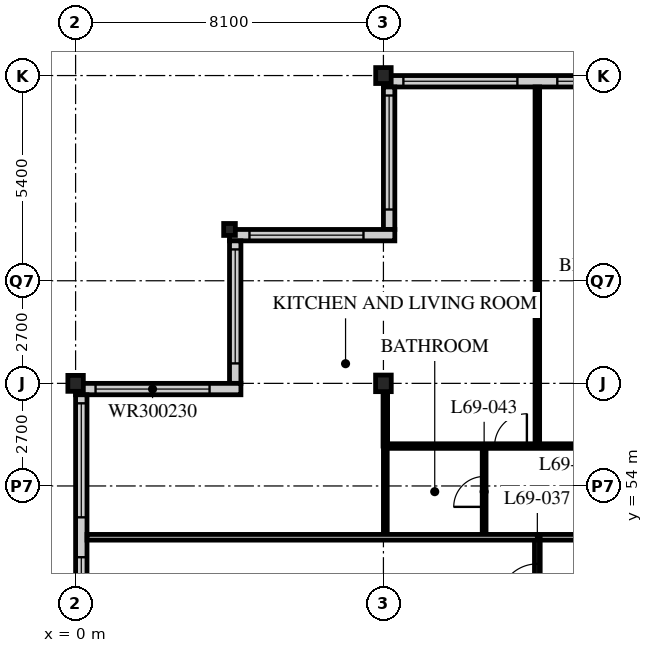
"""IFC4 building model, lengths in metres.
Left out: names, types, materials, properties, quantities, classifications, styles, units other than length and angle.
Written with IfcOpenShell. Run it as: python <this file> out.ifc"""

import sys

from ifc_helpers import new_model, si_unit, direction, frame, frame_2d, origin, origin_2d, place, context, subcontext, project, spatial, rectangle, i_section, extrude, element, fill, save


model = new_model("IFC4")
c1 = context("Model", 3, precision=1e-05, world=origin(), true_north=direction((0.0, 1.0)))
c2 = subcontext(c1, "Body", "Model", "MODEL_VIEW")
j1 = project(units=[si_unit("LENGTHUNIT", "METRE"), si_unit("PLANEANGLEUNIT", "RADIAN")], contexts=[c1])
p1 = place(None, origin())
s1 = spatial("IfcSite", under=j1, at=p1, CompositionType="ELEMENT")
p2 = place(p1, origin())
s2 = spatial("IfcBuilding", under=s1, at=p2, CompositionType="ELEMENT")
p3 = place(p2, frame((0.0, 0.0, 269.7)))
s3 = spatial("IfcBuildingStorey", under=s2, at=p3, CompositionType="ELEMENT", Elevation=269.7)
p4 = place(p3, frame((0.0, 56.7, 0.0), z_axis=(0.0, 0.0, 1.0), x_axis=(1.0, 0.0, 0.0)))
e1 = element("IfcColumn", 1, at=p4, inside=s3, PredefinedType="COLUMN", context=c2, shape_type="SweptSolid", body=[
    extrude(i_section(OverallWidth=0.407, OverallDepth=0.419, WebThickness=0.031, FlangeThickness=0.049, FilletRadius=0.015, at=origin_2d()), origin(), (0.0, 0.0, 1.0), 3.9),
])
p5 = place(p3, frame((4.05, 60.75, 0.0), z_axis=(0.0, 0.0, 1.0), x_axis=(1.0, 0.0, 0.0)))
e2 = element("IfcColumn", 2, at=p5, inside=s3, PredefinedType="COLUMN", context=c2, shape_type="SweptSolid", body=[
    extrude(i_section(OverallWidth=0.307, OverallDepth=0.314, WebThickness=0.012, FlangeThickness=0.019, FilletRadius=0.015, at=origin_2d()), origin(), (0.0, 0.0, 1.0), 3.9),
])
p6 = place(p3, frame((8.1, 56.7, 0.0), z_axis=(0.0, 0.0, 1.0), x_axis=(1.0, 0.0, 0.0)))
e3 = element("IfcColumn", 3, at=p6, inside=s3, PredefinedType="COLUMN", context=c2, shape_type="SweptSolid", body=[
    extrude(i_section(OverallWidth=0.412, OverallDepth=0.437, WebThickness=0.036, FlangeThickness=0.058, FilletRadius=0.015, at=origin_2d()), origin(), (0.0, 0.0, 1.0), 3.9),
])
p7 = place(p3, frame((8.1, 64.8, 0.0), z_axis=(0.0, 0.0, 1.0), x_axis=(1.0, 0.0, 0.0)))
e4 = element("IfcColumn", 4, at=p7, inside=s3, PredefinedType="COLUMN", context=c2, shape_type="SweptSolid", body=[
    extrude(i_section(OverallWidth=0.407, OverallDepth=0.419, WebThickness=0.031, FlangeThickness=0.049, FilletRadius=0.015, at=origin_2d()), origin(), (0.0, 0.0, 1.0), 3.9),
])
p8 = place(p3, frame((48.3, 64.65, 0.0), z_axis=(0.0, 0.0, 1.0), x_axis=(-1.0, 0.0, 0.0)))
e5 = element("IfcWall", 5, at=p8, inside=s3, PredefinedType="SOLIDWALL", context=c2, shape_type="SweptSolid", body=[
    extrude(rectangle(XDim=40.2, YDim=0.3, at=frame_2d((20.1, 0.0))), origin(), (0.0, 0.0, 1.0), 3.69),
])
p9 = place(p8, frame((0.225, 0.0, 0.6)))
e6 = element("IfcOpeningElement", 6, at=p9, cuts=e5, PredefinedType="OPENING", context=c2, shape_type="SweptSolid", body=[
    extrude(rectangle(XDim=3.0, YDim=2.4, at=frame_2d((1.5, 1.2))), frame((0.0, 0.16, 0.0), z_axis=(0.0, -1.0, 0.0), x_axis=(1.0, 0.0, 0.0)), (0.0, 0.0, 1.0), 0.32),
])
p10 = place(p8, frame((4.275, 0.0, 0.6)))
e7 = element("IfcOpeningElement", 7, at=p10, cuts=e5, PredefinedType="OPENING", context=c2, shape_type="SweptSolid", body=[
    extrude(rectangle(XDim=3.0, YDim=2.4, at=frame_2d((1.5, 1.2))), frame((0.0, 0.16, 0.0), z_axis=(0.0, -1.0, 0.0), x_axis=(1.0, 0.0, 0.0)), (0.0, 0.0, 1.0), 0.32),
])
p11 = place(p8, frame((8.325, 0.0, 0.6)))
e8 = element("IfcOpeningElement", 8, at=p11, cuts=e5, PredefinedType="OPENING", context=c2, shape_type="SweptSolid", body=[
    extrude(rectangle(XDim=3.0, YDim=2.4, at=frame_2d((1.5, 1.2))), frame((0.0, 0.16, 0.0), z_axis=(0.0, -1.0, 0.0), x_axis=(1.0, 0.0, 0.0)), (0.0, 0.0, 1.0), 0.32),
])
p12 = place(p8, frame((12.375, 0.0, 0.6)))
e9 = element("IfcOpeningElement", 9, at=p12, cuts=e5, PredefinedType="OPENING", context=c2, shape_type="SweptSolid", body=[
    extrude(rectangle(XDim=3.0, YDim=2.4, at=frame_2d((1.5, 1.2))), frame((0.0, 0.16, 0.0), z_axis=(0.0, -1.0, 0.0), x_axis=(1.0, 0.0, 0.0)), (0.0, 0.0, 1.0), 0.32),
])
p13 = place(p8, frame((16.425, 0.0, 0.6)))
e10 = element("IfcOpeningElement", 10, at=p13, cuts=e5, PredefinedType="OPENING", context=c2, shape_type="SweptSolid", body=[
    extrude(rectangle(XDim=3.0, YDim=2.4, at=frame_2d((1.5, 1.2))), frame((0.0, 0.16, 0.0), z_axis=(0.0, -1.0, 0.0), x_axis=(1.0, 0.0, 0.0)), (0.0, 0.0, 1.0), 0.32),
])
p14 = place(p8, frame((20.475, 0.0, 0.6)))
e11 = element("IfcOpeningElement", 11, at=p14, cuts=e5, PredefinedType="OPENING", context=c2, shape_type="SweptSolid", body=[
    extrude(rectangle(XDim=3.0, YDim=2.4, at=frame_2d((1.5, 1.2))), frame((0.0, 0.16, 0.0), z_axis=(0.0, -1.0, 0.0), x_axis=(1.0, 0.0, 0.0)), (0.0, 0.0, 1.0), 0.32),
])
p15 = place(p8, frame((24.525, 0.0, 0.6)))
e12 = element("IfcOpeningElement", 12, at=p15, cuts=e5, PredefinedType="OPENING", context=c2, shape_type="SweptSolid", body=[
    extrude(rectangle(XDim=3.0, YDim=2.4, at=frame_2d((1.5, 1.2))), frame((0.0, 0.16, 0.0), z_axis=(0.0, -1.0, 0.0), x_axis=(1.0, 0.0, 0.0)), (0.0, 0.0, 1.0), 0.32),
])
p16 = place(p8, frame((28.575, 0.0, 0.6)))
e13 = element("IfcOpeningElement", 13, at=p16, cuts=e5, PredefinedType="OPENING", context=c2, shape_type="SweptSolid", body=[
    extrude(rectangle(XDim=3.0, YDim=2.4, at=frame_2d((1.5, 1.2))), frame((0.0, 0.16, 0.0), z_axis=(0.0, -1.0, 0.0), x_axis=(1.0, 0.0, 0.0)), (0.0, 0.0, 1.0), 0.32),
])
p17 = place(p8, frame((32.625, 0.0, 0.6)))
e14 = element("IfcOpeningElement", 14, at=p17, cuts=e5, PredefinedType="OPENING", context=c2, shape_type="SweptSolid", body=[
    extrude(rectangle(XDim=3.0, YDim=2.4, at=frame_2d((1.5, 1.2))), frame((0.0, 0.16, 0.0), z_axis=(0.0, -1.0, 0.0), x_axis=(1.0, 0.0, 0.0)), (0.0, 0.0, 1.0), 0.32),
])
p18 = place(p8, frame((36.675, 0.0, 0.6)))
e15 = element("IfcOpeningElement", 15, at=p18, cuts=e5, PredefinedType="OPENING", context=c2, shape_type="SweptSolid", body=[
    extrude(rectangle(XDim=3.0, YDim=2.4, at=frame_2d((1.5, 1.2))), frame((0.0, 0.16, 0.0), z_axis=(0.0, -1.0, 0.0), x_axis=(1.0, 0.0, 0.0)), (0.0, 0.0, 1.0), 0.32),
])
p19 = place(p3, frame((8.25, 64.5, 0.0), z_axis=(0.0, 0.0, 1.0), x_axis=(0.0, -1.0, 0.0)))
e16 = element("IfcWall", 16, at=p19, inside=s3, PredefinedType="SOLIDWALL", context=c2, shape_type="SweptSolid", body=[
    extrude(rectangle(XDim=3.75, YDim=0.3, at=frame_2d((1.875, 0.0))), origin(), (0.0, 0.0, 1.0), 3.69),
])
p20 = place(p19, frame((0.225, 0.0, 0.6)))
e17 = element("IfcOpeningElement", 17, at=p20, cuts=e16, PredefinedType="OPENING", context=c2, shape_type="SweptSolid", body=[
    extrude(rectangle(XDim=3.0, YDim=2.3, at=frame_2d((1.5, 1.15))), frame((0.0, 0.16, 0.0), z_axis=(0.0, -1.0, 0.0), x_axis=(1.0, 0.0, 0.0)), (0.0, 0.0, 1.0), 0.32),
])
p21 = place(p3, frame((8.4, 60.6, 0.0), z_axis=(0.0, 0.0, 1.0), x_axis=(-1.0, 0.0, 0.0)))
e18 = element("IfcWall", 18, at=p21, inside=s3, PredefinedType="SOLIDWALL", context=c2, shape_type="SweptSolid", body=[
    extrude(rectangle(XDim=4.35, YDim=0.3, at=frame_2d((2.175, 0.0))), origin(), (0.0, 0.0, 1.0), 3.69),
])
p22 = place(p21, frame((0.825, 0.0, 0.6)))
e19 = element("IfcOpeningElement", 19, at=p22, cuts=e18, PredefinedType="OPENING", context=c2, shape_type="SweptSolid", body=[
    extrude(rectangle(XDim=3.0, YDim=2.3, at=frame_2d((1.5, 1.15))), frame((0.0, 0.16, 0.0), z_axis=(0.0, -1.0, 0.0), x_axis=(1.0, 0.0, 0.0)), (0.0, 0.0, 1.0), 0.32),
])
p23 = place(p3, frame((4.2, 60.45, 0.0), z_axis=(0.0, 0.0, 1.0), x_axis=(0.0, -1.0, 0.0)))
e20 = element("IfcWall", 20, at=p23, inside=s3, PredefinedType="SOLIDWALL", context=c2, shape_type="SweptSolid", body=[
    extrude(rectangle(XDim=3.75, YDim=0.3, at=frame_2d((1.875, 0.0))), origin(), (0.0, 0.0, 1.0), 3.69),
])
p24 = place(p23, frame((0.225, 0.0, 0.6)))
e21 = element("IfcOpeningElement", 21, at=p24, cuts=e20, PredefinedType="OPENING", context=c2, shape_type="SweptSolid", body=[
    extrude(rectangle(XDim=3.0, YDim=2.3, at=frame_2d((1.5, 1.15))), frame((0.0, 0.16, 0.0), z_axis=(0.0, -1.0, 0.0), x_axis=(1.0, 0.0, 0.0)), (0.0, 0.0, 1.0), 0.32),
])
p25 = place(p3, frame((4.35, 56.55, 0.0), z_axis=(0.0, 0.0, 1.0), x_axis=(-1.0, 0.0, 0.0)))
e22 = element("IfcWall", 22, at=p25, inside=s3, PredefinedType="SOLIDWALL", context=c2, shape_type="SweptSolid", body=[
    extrude(rectangle(XDim=4.35, YDim=0.3, at=frame_2d((2.175, 0.0))), origin(), (0.0, 0.0, 1.0), 3.69),
])
p26 = place(p25, frame((0.825, 0.0, 0.6)))
e23 = element("IfcOpeningElement", 23, at=p26, cuts=e22, PredefinedType="OPENING", context=c2, shape_type="SweptSolid", body=[
    extrude(rectangle(XDim=3.0, YDim=2.3, at=frame_2d((1.5, 1.15))), frame((0.0, 0.16, 0.0), z_axis=(0.0, -1.0, 0.0), x_axis=(1.0, 0.0, 0.0)), (0.0, 0.0, 1.0), 0.32),
])
p27 = place(p3, frame((0.15, 56.4, 0.0), z_axis=(0.0, 0.0, 1.0), x_axis=(0.0, -1.0, 0.0)))
e24 = element("IfcWall", 24, at=p27, inside=s3, PredefinedType="SOLIDWALL", context=c2, shape_type="SweptSolid", body=[
    extrude(rectangle(XDim=32.1, YDim=0.3, at=frame_2d((16.05, 0.0))), origin(), (0.0, 0.0, 1.0), 3.69),
])
p28 = place(p27, frame((0.225, 0.0, 0.6)))
e25 = element("IfcOpeningElement", 25, at=p28, cuts=e24, PredefinedType="OPENING", context=c2, shape_type="SweptSolid", body=[
    extrude(rectangle(XDim=3.0, YDim=2.4, at=frame_2d((1.5, 1.2))), frame((0.0, 0.16, 0.0), z_axis=(0.0, -1.0, 0.0), x_axis=(1.0, 0.0, 0.0)), (0.0, 0.0, 1.0), 0.32),
])
p29 = place(p27, frame((4.275, 0.0, 0.6)))
e26 = element("IfcOpeningElement", 26, at=p29, cuts=e24, PredefinedType="OPENING", context=c2, shape_type="SweptSolid", body=[
    extrude(rectangle(XDim=3.0, YDim=2.4, at=frame_2d((1.5, 1.2))), frame((0.0, 0.16, 0.0), z_axis=(0.0, -1.0, 0.0), x_axis=(1.0, 0.0, 0.0)), (0.0, 0.0, 1.0), 0.32),
])
p30 = place(p27, frame((8.325, 0.0, 0.6)))
e27 = element("IfcOpeningElement", 27, at=p30, cuts=e24, PredefinedType="OPENING", context=c2, shape_type="SweptSolid", body=[
    extrude(rectangle(XDim=3.0, YDim=2.4, at=frame_2d((1.5, 1.2))), frame((0.0, 0.16, 0.0), z_axis=(0.0, -1.0, 0.0), x_axis=(1.0, 0.0, 0.0)), (0.0, 0.0, 1.0), 0.32),
])
p31 = place(p27, frame((12.375, 0.0, 0.6)))
e28 = element("IfcOpeningElement", 28, at=p31, cuts=e24, PredefinedType="OPENING", context=c2, shape_type="SweptSolid", body=[
    extrude(rectangle(XDim=3.0, YDim=2.4, at=frame_2d((1.5, 1.2))), frame((0.0, 0.16, 0.0), z_axis=(0.0, -1.0, 0.0), x_axis=(1.0, 0.0, 0.0)), (0.0, 0.0, 1.0), 0.32),
])
p32 = place(p27, frame((16.425, 0.0, 0.6)))
e29 = element("IfcOpeningElement", 29, at=p32, cuts=e24, PredefinedType="OPENING", context=c2, shape_type="SweptSolid", body=[
    extrude(rectangle(XDim=3.0, YDim=2.4, at=frame_2d((1.5, 1.2))), frame((0.0, 0.16, 0.0), z_axis=(0.0, -1.0, 0.0), x_axis=(1.0, 0.0, 0.0)), (0.0, 0.0, 1.0), 0.32),
])
p33 = place(p27, frame((20.475, 0.0, 0.6)))
e30 = element("IfcOpeningElement", 30, at=p33, cuts=e24, PredefinedType="OPENING", context=c2, shape_type="SweptSolid", body=[
    extrude(rectangle(XDim=3.0, YDim=2.4, at=frame_2d((1.5, 1.2))), frame((0.0, 0.16, 0.0), z_axis=(0.0, -1.0, 0.0), x_axis=(1.0, 0.0, 0.0)), (0.0, 0.0, 1.0), 0.32),
])
p34 = place(p27, frame((24.525, 0.0, 0.6)))
e31 = element("IfcOpeningElement", 31, at=p34, cuts=e24, PredefinedType="OPENING", context=c2, shape_type="SweptSolid", body=[
    extrude(rectangle(XDim=3.0, YDim=2.4, at=frame_2d((1.5, 1.2))), frame((0.0, 0.16, 0.0), z_axis=(0.0, -1.0, 0.0), x_axis=(1.0, 0.0, 0.0)), (0.0, 0.0, 1.0), 0.32),
])
p35 = place(p27, frame((28.575, 0.0, 0.6)))
e32 = element("IfcOpeningElement", 32, at=p35, cuts=e24, PredefinedType="OPENING", context=c2, shape_type="SweptSolid", body=[
    extrude(rectangle(XDim=3.0, YDim=2.4, at=frame_2d((1.5, 1.2))), frame((0.0, 0.16, 0.0), z_axis=(0.0, -1.0, 0.0), x_axis=(1.0, 0.0, 0.0)), (0.0, 0.0, 1.0), 0.32),
])
p36 = place(p3, frame((12.15, 52.65, 0.0), z_axis=(0.0, 0.0, 1.0), x_axis=(1.0, 0.0, 0.0)))
e33 = element("IfcWall", 33, at=p36, inside=s3, PredefinedType="PARTITIONING", context=c2, shape_type="SweptSolid", body=[
    extrude(rectangle(XDim=24.3, YDim=0.15, at=frame_2d((12.15, 0.0))), origin(), (0.0, 0.0, 1.0), 3.69),
])
p37 = place(p36, frame((6.4, 0.0, 0.0)))
e34 = element("IfcOpeningElement", 34, at=p37, cuts=e33, PredefinedType="OPENING", context=c2, shape_type="SweptSolid", body=[
    extrude(rectangle(XDim=1.0, YDim=2.1, at=frame_2d((0.5, 1.05))), frame((0.0, 0.085, 0.0), z_axis=(0.0, -1.0, 0.0), x_axis=(1.0, 0.0, 0.0)), (0.0, 0.0, 1.0), 0.17),
])
p38 = place(p36, frame((8.5, 0.0, 0.0)))
e35 = element("IfcOpeningElement", 35, at=p38, cuts=e33, PredefinedType="OPENING", context=c2, shape_type="SweptSolid", body=[
    extrude(rectangle(XDim=1.0, YDim=2.1, at=frame_2d((0.5, 1.05))), frame((0.0, 0.085, 0.0), z_axis=(0.0, -1.0, 0.0), x_axis=(1.0, 0.0, 0.0)), (0.0, 0.0, 1.0), 0.17),
])
p39 = place(p36, frame((16.6, 0.0, 0.0)))
e36 = element("IfcOpeningElement", 36, at=p39, cuts=e33, PredefinedType="OPENING", context=c2, shape_type="SweptSolid", body=[
    extrude(rectangle(XDim=1.0, YDim=2.1, at=frame_2d((0.5, 1.05))), frame((0.0, 0.085, 0.0), z_axis=(0.0, -1.0, 0.0), x_axis=(1.0, 0.0, 0.0)), (0.0, 0.0, 1.0), 0.17),
])
p40 = place(p36, frame((1.525, 0.0, 0.0)))
e37 = element("IfcOpeningElement", 37, at=p40, cuts=e33, PredefinedType="OPENING", context=c2, shape_type="SweptSolid", body=[
    extrude(rectangle(XDim=1.0, YDim=2.1, at=frame_2d((0.5, 1.05))), frame((0.0, 0.085, 0.0), z_axis=(0.0, -1.0, 0.0), x_axis=(1.0, 0.0, 0.0)), (0.0, 0.0, 1.0), 0.17),
])
p41 = place(p3, frame((12.15, 22.5, 0.0), z_axis=(0.0, 0.0, 1.0), x_axis=(0.0, 1.0, 0.0)))
e38 = element("IfcWall", 38, at=p41, inside=s3, PredefinedType="PARTITIONING", context=c2, shape_type="SweptSolid", body=[
    extrude(rectangle(XDim=30.15, YDim=0.15, at=frame_2d((15.075, 0.0))), origin(), (0.0, 0.0, 1.0), 3.69),
])
p42 = place(p41, frame((0.4, 0.0, 0.0)))
e39 = element("IfcOpeningElement", 39, at=p42, cuts=e38, PredefinedType="OPENING", context=c2, shape_type="SweptSolid", body=[
    extrude(rectangle(XDim=1.0, YDim=2.1, at=frame_2d((0.5, 1.05))), frame((0.0, 0.085, 0.0), z_axis=(0.0, -1.0, 0.0), x_axis=(1.0, 0.0, 0.0)), (0.0, 0.0, 1.0), 0.17),
])
p43 = place(p41, frame((18.4, 0.0, 0.0)))
e40 = element("IfcOpeningElement", 40, at=p43, cuts=e38, PredefinedType="OPENING", context=c2, shape_type="SweptSolid", body=[
    extrude(rectangle(XDim=1.0, YDim=2.1, at=frame_2d((0.5, 1.05))), frame((0.0, 0.085, 0.0), z_axis=(0.0, -1.0, 0.0), x_axis=(1.0, 0.0, 0.0)), (0.0, 0.0, 1.0), 0.17),
])
p44 = place(p41, frame((28.45, 0.0, 0.0)))
e41 = element("IfcOpeningElement", 41, at=p44, cuts=e38, PredefinedType="OPENING", context=c2, shape_type="SweptSolid", body=[
    extrude(rectangle(XDim=1.0, YDim=2.1, at=frame_2d((0.5, 1.05))), frame((0.0, 0.085, 0.0), z_axis=(0.0, -1.0, 0.0), x_axis=(1.0, 0.0, 0.0)), (0.0, 0.0, 1.0), 0.17),
])
p45 = place(p3, frame((10.75, 52.65, 0.0), z_axis=(0.0, 0.0, 1.0), x_axis=(0.0, 1.0, 0.0)))
e42 = element("IfcWall", 42, at=p45, inside=s3, PredefinedType="PARTITIONING", context=c2, shape_type="SweptSolid", body=[
    extrude(rectangle(XDim=2.4, YDim=0.1, at=frame_2d((1.2, 0.0))), origin(), (0.0, 0.0, 1.0), 3.69),
])
p46 = place(p45, frame((0.8, 0.0, 0.0)))
e43 = element("IfcOpeningElement", 43, at=p46, cuts=e42, PredefinedType="OPENING", context=c2, shape_type="SweptSolid", body=[
    extrude(rectangle(XDim=0.8, YDim=2.1, at=frame_2d((0.4, 1.05))), frame((0.0, 0.06, 0.0), z_axis=(0.0, -1.0, 0.0), x_axis=(1.0, 0.0, 0.0)), (0.0, 0.0, 1.0), 0.12),
])
p47 = place(p3, frame((8.15, 52.65, 0.0), z_axis=(0.0, 0.0, 1.0), x_axis=(0.0, 1.0, 0.0)))
e44 = element("IfcWall", 44, at=p47, inside=s3, PredefinedType="PARTITIONING", context=c2, shape_type="SweptSolid", body=[
    extrude(rectangle(XDim=2.4, YDim=0.1, at=frame_2d((1.2, 0.0))), origin(), (0.0, 0.0, 1.0), 3.078),
])
p48 = place(p3, frame((8.15, 55.05, 0.0), z_axis=(0.0, 0.0, 1.0), x_axis=(1.0, 0.0, 0.0)))
e45 = element("IfcWall", 45, at=p48, inside=s3, PredefinedType="PARTITIONING", context=c2, shape_type="SweptSolid", body=[
    extrude(rectangle(XDim=8.05, YDim=0.12, at=frame_2d((4.025, 0.0))), origin(), (0.0, 0.0, 1.0), 3.69),
])
p49 = place(p48, frame((6.725, 0.0, 0.0)))
e46 = element("IfcOpeningElement", 46, at=p49, cuts=e45, PredefinedType="OPENING", context=c2, shape_type="SweptSolid", body=[
    extrude(rectangle(XDim=0.85, YDim=2.1, at=frame_2d((0.425, 1.05))), frame((0.0, 0.07, 0.0), z_axis=(0.0, -1.0, 0.0), x_axis=(1.0, 0.0, 0.0)), (0.0, 0.0, 1.0), 0.14),
])
p50 = place(p48, frame((2.875, 0.0, 0.0)))
e47 = element("IfcOpeningElement", 47, at=p50, cuts=e45, PredefinedType="OPENING", context=c2, shape_type="SweptSolid", body=[
    extrude(rectangle(XDim=0.85, YDim=2.1, at=frame_2d((0.425, 1.05))), frame((0.0, 0.07, 0.0), z_axis=(0.0, -1.0, 0.0), x_axis=(1.0, 0.0, 0.0)), (0.0, 0.0, 1.0), 0.14),
])
p51 = place(p3, frame((12.15, 55.05, 0.0), z_axis=(0.0, 0.0, 1.0), x_axis=(0.0, 1.0, 0.0)))
e48 = element("IfcWall", 48, at=p51, inside=s3, PredefinedType="PARTITIONING", context=c2, shape_type="SweptSolid", body=[
    extrude(rectangle(XDim=9.45, YDim=0.12, at=frame_2d((4.725, 0.0))), origin(), (0.0, 0.0, 1.0), 3.69),
])
p52 = place(p3, frame((0.3, 52.65, 0.0), z_axis=(0.0, 0.0, 1.0), x_axis=(1.0, 0.0, 0.0)))
e49 = element("IfcWall", 49, at=p52, inside=s3, PredefinedType="PARTITIONING", context=c2, shape_type="SweptSolid", body=[
    extrude(rectangle(XDim=11.85, YDim=0.15, at=frame_2d((5.925, 0.0))), origin(), (0.0, 0.0, 1.0), 3.69),
])
p53 = place(p3, frame((8.15, 55.05, 0.0), z_axis=(0.0, 0.0, 1.0), x_axis=(0.0, 1.0, 0.0)))
e50 = element("IfcWall", 50, at=p53, inside=s3, PredefinedType="PARTITIONING", context=c2, shape_type="SweptSolid", body=[
    extrude(rectangle(XDim=1.447, YDim=0.12, at=frame_2d((0.724, 0.0))), origin(), (0.0, 0.0, 1.0), 3.078),
])
p54 = place(p17, origin())
e51 = element("IfcWindow", 51, at=p54, inside=s3, PartitioningType="SINGLE_PANEL", PredefinedType="WINDOW", context=c2, shape_type="SweptSolid", body=[
    extrude(rectangle(XDim=3.0, YDim=2.4, at=frame_2d((1.5, 1.2))), frame((0.0, 0.03, 0.0), z_axis=(0.0, -1.0, 0.0), x_axis=(1.0, 0.0, 0.0)), (0.0, 0.0, 1.0), 0.06),
])
fill(e14, e51)
p55 = place(p18, origin())
e52 = element("IfcWindow", 52, at=p55, inside=s3, PartitioningType="SINGLE_PANEL", PredefinedType="WINDOW", context=c2, shape_type="SweptSolid", body=[
    extrude(rectangle(XDim=3.0, YDim=2.4, at=frame_2d((1.5, 1.2))), frame((0.0, 0.03, 0.0), z_axis=(0.0, -1.0, 0.0), x_axis=(1.0, 0.0, 0.0)), (0.0, 0.0, 1.0), 0.06),
])
fill(e15, e52)
p56 = place(p20, origin())
e53 = element("IfcWindow", 53, at=p56, inside=s3, PartitioningType="SINGLE_PANEL", PredefinedType="WINDOW", context=c2, shape_type="SweptSolid", body=[
    extrude(rectangle(XDim=3.0, YDim=2.3, at=frame_2d((1.5, 1.15))), frame((0.0, 0.03, 0.0), z_axis=(0.0, -1.0, 0.0), x_axis=(1.0, 0.0, 0.0)), (0.0, 0.0, 1.0), 0.06),
])
fill(e17, e53)
p57 = place(p22, origin())
e54 = element("IfcWindow", 54, at=p57, inside=s3, PartitioningType="SINGLE_PANEL", PredefinedType="WINDOW", context=c2, shape_type="SweptSolid", body=[
    extrude(rectangle(XDim=3.0, YDim=2.3, at=frame_2d((1.5, 1.15))), frame((0.0, 0.03, 0.0), z_axis=(0.0, -1.0, 0.0), x_axis=(1.0, 0.0, 0.0)), (0.0, 0.0, 1.0), 0.06),
])
fill(e19, e54)
p58 = place(p24, origin())
e55 = element("IfcWindow", 55, at=p58, inside=s3, PartitioningType="SINGLE_PANEL", PredefinedType="WINDOW", context=c2, shape_type="SweptSolid", body=[
    extrude(rectangle(XDim=3.0, YDim=2.3, at=frame_2d((1.5, 1.15))), frame((0.0, 0.03, 0.0), z_axis=(0.0, -1.0, 0.0), x_axis=(1.0, 0.0, 0.0)), (0.0, 0.0, 1.0), 0.06),
])
fill(e21, e55)
p59 = place(p26, origin())
e56 = element("IfcWindow", 56, at=p59, inside=s3, PartitioningType="SINGLE_PANEL", PredefinedType="WINDOW", context=c2, shape_type="SweptSolid", body=[
    extrude(rectangle(XDim=3.0, YDim=2.3, at=frame_2d((1.5, 1.15))), frame((0.0, 0.03, 0.0), z_axis=(0.0, -1.0, 0.0), x_axis=(1.0, 0.0, 0.0)), (0.0, 0.0, 1.0), 0.06),
])
fill(e23, e56)
p60 = place(p28, origin())
e57 = element("IfcWindow", 57, at=p60, inside=s3, PartitioningType="SINGLE_PANEL", PredefinedType="WINDOW", context=c2, shape_type="SweptSolid", body=[
    extrude(rectangle(XDim=3.0, YDim=2.4, at=frame_2d((1.5, 1.2))), frame((0.0, 0.03, 0.0), z_axis=(0.0, -1.0, 0.0), x_axis=(1.0, 0.0, 0.0)), (0.0, 0.0, 1.0), 0.06),
])
fill(e25, e57)
p61 = place(p29, origin())
e58 = element("IfcWindow", 58, at=p61, inside=s3, PartitioningType="SINGLE_PANEL", PredefinedType="WINDOW", context=c2, shape_type="SweptSolid", body=[
    extrude(rectangle(XDim=3.0, YDim=2.4, at=frame_2d((1.5, 1.2))), frame((0.0, 0.03, 0.0), z_axis=(0.0, -1.0, 0.0), x_axis=(1.0, 0.0, 0.0)), (0.0, 0.0, 1.0), 0.06),
])
fill(e26, e58)
p62 = place(p44, origin())
e59 = element("IfcDoor", 59, at=p62, inside=s3, OperationType="SINGLE_SWING_LEFT", PredefinedType="DOOR", context=c2, shape_type="SweptSolid", body=[
    extrude(rectangle(XDim=1.0, YDim=2.1, at=frame_2d((0.5, 1.05))), frame((0.0, 0.025, 0.0), z_axis=(0.0, -1.0, 0.0), x_axis=(1.0, 0.0, 0.0)), (0.0, 0.0, 1.0), 0.05),
])
fill(e41, e59)
p63 = place(p46, origin())
e60 = element("IfcDoor", 60, at=p63, inside=s3, OperationType="SINGLE_SWING_LEFT", PredefinedType="DOOR", context=c2, shape_type="SweptSolid", body=[
    extrude(rectangle(XDim=0.8, YDim=2.1, at=frame_2d((0.4, 1.05))), frame((0.0, 0.025, 0.0), z_axis=(0.0, -1.0, 0.0), x_axis=(1.0, 0.0, 0.0)), (0.0, 0.0, 1.0), 0.05),
])
fill(e43, e60)
p64 = place(p50, origin())
e61 = element("IfcDoor", 61, at=p64, inside=s3, OperationType="SINGLE_SWING_RIGHT", PredefinedType="DOOR", context=c2, shape_type="SweptSolid", body=[
    extrude(rectangle(XDim=0.85, YDim=2.1, at=frame_2d((0.425, 1.05))), frame((0.0, 0.025, 0.0), z_axis=(0.0, -1.0, 0.0), x_axis=(1.0, 0.0, 0.0)), (0.0, 0.0, 1.0), 0.05),
])
fill(e47, e61)
save(model, sys.argv[1])
